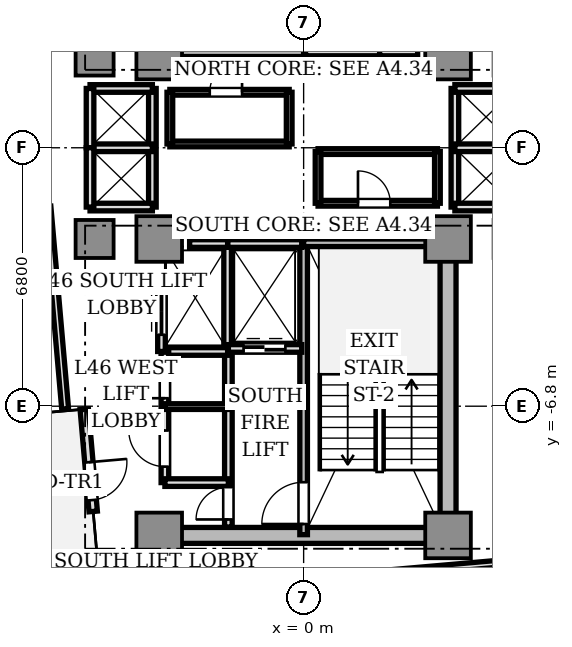
"""IFC4 building model, lengths in metres.
Left out: names, types, materials, properties, quantities, classifications, styles, units other than length and angle.
Written with IfcOpenShell. Run it as: python <this file> out.ifc"""

import sys

from ifc_helpers import new_model, si_unit, direction, frame, frame_2d, origin, origin_2d, place, context, subcontext, project, spatial, rectangle, extrude, source, transform, mapped, element, fill, save


model = new_model("IFC4")
c1 = context("Model", 3, precision=1e-05, world=origin(), true_north=direction((0.0, 1.0)))
c2 = subcontext(c1, "Body", "Model", "MODEL_VIEW")
j1 = project(units=[si_unit("LENGTHUNIT", "METRE"), si_unit("PLANEANGLEUNIT", "RADIAN")], contexts=[c1])
p1 = place(None, origin())
s1 = spatial("IfcSite", under=j1, at=p1, CompositionType="ELEMENT")
p2 = place(p1, origin())
s2 = spatial("IfcBuilding", under=s1, at=p2, CompositionType="ELEMENT")
p3 = place(p2, frame((0.0, 0.0, 167.35)))
s3 = spatial("IfcBuildingStorey", under=s2, at=p3, CompositionType="ELEMENT", Elevation=167.35)
p4 = place(p3, frame((-3.55, -10.2, 0.0), z_axis=(0.0, 0.0, 1.0), x_axis=(1.0, 0.0, 0.0)))
e1 = element("IfcWall", 1, at=p4, inside=s3, PredefinedType="SHEAR", context=c2, shape_type="SweptSolid", body=[
    extrude(rectangle(XDim=7.1, YDim=0.42, at=frame_2d((3.55, 0.0))), origin(), (0.0, 0.0, 1.0), 3.05),
])
p5 = place(p3, frame((3.8, -9.75, 0.0), z_axis=(0.0, 0.0, 1.0), x_axis=(0.0, 1.0, 0.0)))
e2 = element("IfcWall", 2, at=p5, inside=s3, PredefinedType="SHEAR", context=c2, shape_type="SweptSolid", body=[
    extrude(rectangle(XDim=6.9, YDim=0.42, at=frame_2d((3.45, 0.0))), origin(), (0.0, 0.0, 1.0), 3.05),
])
m1 = source(origin(), c2, "Body", "SweptSolid", [
    extrude(rectangle(XDim=1.2, YDim=1.2, at=origin_2d()), origin(), (0.0, 0.0, 1.0), 3.05),
])
for number, where, z_axis, x_axis in (
    (3, (-3.8, 2.4, 0.0), (0.0, 0.0, 1.0), (1.0, 0.0, 0.0)),
    (4, (3.8, 2.4, 0.0), (0.0, 0.0, 1.0), (1.0, 0.0, 0.0)),
    (5, (-3.8, -2.4, 0.0), (0.0, 0.0, 1.0), (1.0, 0.0, 0.0)),
    (6, (3.8, -2.4, 0.0), (0.0, 0.0, 1.0), (1.0, 0.0, 0.0)),
    (7, (-3.8, -10.2, 0.0), (0.0, 0.0, 1.0), (1.0, 0.0, 0.0)),
    (8, (3.8, -10.2, 0.0), (0.0, 0.0, 1.0), (1.0, 0.0, 0.0)),
):
    element("IfcColumn", number, at=place(p3, frame(where, z_axis=z_axis, x_axis=x_axis)), inside=s3, PredefinedType="COLUMN", context=c2, shape_type="MappedRepresentation", body=[
        mapped(m1, transform((0.0, 0.0, 0.0), scale=1.0)),
    ])
m2 = source(origin(), c2, "Body", "SweptSolid", [
    extrude(rectangle(XDim=1.0, YDim=1.0, at=origin_2d()), origin(), (0.0, 0.0, 1.0), 3.05),
])
for number, where, z_axis, x_axis in (
    (9, (-5.5, 2.4, 0.0), (0.0, 0.0, 1.0), (1.0, 0.0, 0.0)),
    (10, (-5.5, -2.4, 0.0), (0.0, 0.0, 1.0), (1.0, 0.0, 0.0)),
):
    element("IfcColumn", number, at=place(p3, frame(where, z_axis=z_axis, x_axis=x_axis)), inside=s3, PredefinedType="COLUMN", context=c2, shape_type="MappedRepresentation", body=[
        mapped(m2, transform((0.0, 0.0, 0.0), scale=1.0)),
    ])
p6 = place(p3, frame((-5.772, -6.879, 0.0), z_axis=(0.0, 0.0, 1.0), x_axis=(0.087168071984, -0.996193619346, 0.0)))
e11 = element("IfcWall", 11, at=p6, inside=s3, PredefinedType="STANDARD", context=c2, shape_type="SweptSolid", body=[
    extrude(rectangle(XDim=2.7, YDim=0.22, at=frame_2d((1.35, 0.0))), origin(), (0.0, 0.0, 1.0), 3.05),
])
p7 = place(p6, frame((1.4, 0.0, 0.0)))
e12 = element("IfcOpeningElement", 12, at=p7, cuts=e11, PredefinedType="OPENING", context=c2, shape_type="SweptSolid", body=[
    extrude(rectangle(XDim=1.0, YDim=2.2, at=frame_2d((0.5, 1.1))), frame((0.0, 0.12, 0.0), z_axis=(0.0, -1.0, 0.0), x_axis=(1.0, 0.0, 0.0)), (0.0, 0.0, 1.0), 0.24),
])
p8 = place(p3, frame((0.0, 2.5, 0.0), z_axis=(0.0, 0.0, 1.0), x_axis=(0.0, 1.0, 0.0)))
e13 = element("IfcWall", 13, at=p8, inside=s3, PredefinedType="SOLIDWALL", context=c2, shape_type="SweptSolid", body=[
    extrude(rectangle(XDim=7.68, YDim=0.2, at=frame_2d((3.84, 0.0))), origin(), (0.0, 0.0, 1.0), 3.05),
])
p9 = place(p8, frame((6.36, 0.0, 0.0)))
e14 = element("IfcOpeningElement", 14, at=p9, cuts=e13, PredefinedType="OPENING", context=c2, shape_type="SweptSolid", body=[
    extrude(rectangle(XDim=1.1, YDim=2.15, at=frame_2d((0.55, 1.075))), frame((0.0, 0.11, 0.0), z_axis=(0.0, -1.0, 0.0), x_axis=(1.0, 0.0, 0.0)), (0.0, 0.0, 1.0), 0.22),
])
p10 = place(p3, frame((-3.72, 2.5, 0.0), z_axis=(0.0, 0.0, 1.0), x_axis=(1.0, 0.0, 0.0)))
e15 = element("IfcWall", 15, at=p10, inside=s3, PredefinedType="SOLIDWALL", context=c2, shape_type="SweptSolid", body=[
    extrude(rectangle(XDim=3.72, YDim=0.2, at=frame_2d((1.86, 0.0))), origin(), (0.0, 0.0, 1.0), 3.05),
])
p11 = place(p3, frame((0.0, -10.18, 0.0), z_axis=(0.0, 0.0, 1.0), x_axis=(0.0, 1.0, 0.0)))
e16 = element("IfcWall", 16, at=p11, inside=s3, PredefinedType="SOLIDWALL", context=c2, shape_type="SweptSolid", body=[
    extrude(rectangle(XDim=7.68, YDim=0.2, at=frame_2d((3.84, 0.0))), origin(), (0.0, 0.0, 1.0), 3.05),
])
p12 = place(p11, frame((0.28, 0.0, 0.0)))
e17 = element("IfcOpeningElement", 17, at=p12, cuts=e16, PredefinedType="OPENING", context=c2, shape_type="SweptSolid", body=[
    extrude(rectangle(XDim=1.1, YDim=2.15, at=frame_2d((0.55, 1.075))), frame((0.0, 0.11, 0.0), z_axis=(0.0, -1.0, 0.0), x_axis=(1.0, 0.0, 0.0)), (0.0, 0.0, 1.0), 0.22),
])
p13 = place(p3, frame((0.0, -2.5, 0.0), z_axis=(0.0, 0.0, 1.0), x_axis=(1.0, 0.0, 0.0)))
e18 = element("IfcWall", 18, at=p13, inside=s3, PredefinedType="SOLIDWALL", context=c2, shape_type="SweptSolid", body=[
    extrude(rectangle(XDim=3.72, YDim=0.2, at=frame_2d((1.86, 0.0))), origin(), (0.0, 0.0, 1.0), 3.05),
])
p14 = place(p3, frame((-1.98, -9.98, 0.0), z_axis=(0.0, 0.0, 1.0), x_axis=(0.0, 1.0, 0.0)))
e19 = element("IfcWall", 19, at=p14, inside=s3, PredefinedType="SOLIDWALL", context=c2, shape_type="SweptSolid", body=[
    extrude(rectangle(XDim=4.66, YDim=0.2, at=frame_2d((2.33, 0.0))), origin(), (0.0, 0.0, 1.0), 2.6),
])
p15 = place(p14, frame((0.2, 0.0, 0.0)))
e20 = element("IfcOpeningElement", 20, at=p15, cuts=e19, PredefinedType="OPENING", context=c2, shape_type="SweptSolid", body=[
    extrude(rectangle(XDim=0.85, YDim=2.1, at=frame_2d((0.425, 1.05))), frame((0.0, 0.11, 0.0), z_axis=(0.0, -1.0, 0.0), x_axis=(1.0, 0.0, 0.0)), (0.0, 0.0, 1.0), 0.22),
])
p16 = place(p3, frame((2.0, 2.5, 0.0), z_axis=(0.0, 0.0, 1.0), x_axis=(0.0, 1.0, 0.0)))
e21 = element("IfcWall", 21, at=p16, inside=s3, PredefinedType="SOLIDWALL", context=c2, shape_type="SweptSolid", body=[
    extrude(rectangle(XDim=2.78, YDim=0.2, at=frame_2d((1.39, 0.0))), origin(), (0.0, 0.0, 1.0), 2.6),
])
p17 = place(p3, frame((0.05, 2.52, 0.0), z_axis=(0.0, 0.0, 1.0), x_axis=(1.0, 0.0, 0.0)))
e22 = element("IfcWall", 22, at=p17, inside=s3, PredefinedType="SOLIDWALL", context=c2, shape_type="SweptSolid", body=[
    extrude(rectangle(XDim=1.95, YDim=0.2, at=frame_2d((0.975, 0.0))), origin(), (0.0, 0.0, 1.0), 2.6),
])
p18 = place(p3, frame((-2.0, -5.28, 0.0), z_axis=(0.0, 0.0, 1.0), x_axis=(0.0, 1.0, 0.0)))
e23 = element("IfcWall", 23, at=p18, inside=s3, PredefinedType="SOLIDWALL", context=c2, shape_type="SweptSolid", body=[
    extrude(rectangle(XDim=2.78, YDim=0.2, at=frame_2d((1.39, 0.0))), origin(), (0.0, 0.0, 1.0), 2.6),
])
p19 = place(p3, frame((-2.0, -2.52, 0.0), z_axis=(0.0, 0.0, 1.0), x_axis=(1.0, 0.0, 0.0)))
e24 = element("IfcWall", 24, at=p19, inside=s3, PredefinedType="SOLIDWALL", context=c2, shape_type="SweptSolid", body=[
    extrude(rectangle(XDim=1.95, YDim=0.2, at=frame_2d((0.975, 0.0))), origin(), (0.0, 0.0, 1.0), 2.6),
])
p20 = place(p3, frame((-1.98, -5.28, 0.0), z_axis=(0.0, 0.0, 1.0), x_axis=(1.0, 0.0, 0.0)))
e25 = element("IfcWall", 25, at=p20, inside=s3, PredefinedType="SOLIDWALL", context=c2, shape_type="SweptSolid", body=[
    extrude(rectangle(XDim=1.93, YDim=0.2, at=frame_2d((0.965, 0.0))), origin(), (0.0, 0.0, 1.0), 2.6),
])
p21 = place(p20, frame((0.4, 0.0, 0.0)))
e26 = element("IfcOpeningElement", 26, at=p21, cuts=e25, PredefinedType="OPENING", context=c2, shape_type="SweptSolid", body=[
    extrude(rectangle(XDim=1.1, YDim=2.2, at=frame_2d((0.55, 1.1))), frame((0.0, 0.11, 0.0), z_axis=(0.0, -1.0, 0.0), x_axis=(1.0, 0.0, 0.0)), (0.0, 0.0, 1.0), 0.22),
])
for number, where, z_axis, x_axis in (
    (27, (2.0, 2.52, 0.0), (0.0, 0.0, 1.0), (1.0, 0.0, 0.0)),
    (28, (-3.0, -2.52, 0.0), (0.0, 0.0, 1.0), (1.0, 0.0, 0.0)),
):
    element("IfcWall", number, at=place(p3, frame(where, z_axis=z_axis, x_axis=x_axis)), inside=s3, PredefinedType="SOLIDWALL", context=c2, shape_type="SweptSolid", body=[
        extrude(rectangle(XDim=1.0, YDim=0.2, at=frame_2d((0.5, 0.0))), origin(), (0.0, 0.0, 1.0), 2.6),
    ])
p22 = place(p3, frame((-3.74, -5.36, 0.0), z_axis=(0.0, 0.0, 1.0), x_axis=(1.0, 0.0, 0.0)))
e29 = element("IfcWall", 29, at=p22, inside=s3, PredefinedType="SOLIDWALL", context=c2, shape_type="SweptSolid", body=[
    extrude(rectangle(XDim=1.74, YDim=0.2, at=frame_2d((0.87, 0.0))), origin(), (0.0, 0.0, 1.0), 2.6),
])
p23 = place(p3, frame((-3.74, -5.36, 0.0), z_axis=(0.0, 0.0, 1.0), x_axis=(0.0, 1.0, 0.0)))
e30 = element("IfcWall", 30, at=p23, inside=s3, PredefinedType="SOLIDWALL", context=c2, shape_type="SweptSolid", body=[
    extrude(rectangle(XDim=2.08, YDim=0.2, at=frame_2d((1.04, 0.0))), origin(), (0.0, 0.0, 1.0), 2.6),
])
p24 = place(p23, frame((0.44, 0.0, 0.0)))
e31 = element("IfcOpeningElement", 31, at=p24, cuts=e30, PredefinedType="OPENING", context=c2, shape_type="SweptSolid", body=[
    extrude(rectangle(XDim=1.2, YDim=2.2, at=frame_2d((0.6, 1.1))), frame((0.0, 0.11, 0.0), z_axis=(0.0, -1.0, 0.0), x_axis=(1.0, 0.0, 0.0)), (0.0, 0.0, 1.0), 0.22),
])
p25 = place(p3, frame((3.98, -1.56, 0.0), z_axis=(0.0, 0.0, 1.0), x_axis=(0.0, 1.0, 0.0)))
e32 = element("IfcWall", 32, at=p25, inside=s3, PredefinedType="SOLIDWALL", context=c2, shape_type="SweptSolid", body=[
    extrude(rectangle(XDim=3.12, YDim=0.2, at=frame_2d((1.56, 0.0))), origin(), (0.0, 0.0, 1.0), 2.22),
])
for number, where, z_axis, x_axis in (
    (33, (3.98, 1.56, 0.0), (0.0, 0.0, 1.0), (1.0, 0.0, 0.0)),
    (34, (3.98, -1.56, 0.0), (0.0, 0.0, 1.0), (1.0, 0.0, 0.0)),
    (35, (3.98, 0.0, 0.0), (0.0, 0.0, 1.0), (1.0, 0.0, 0.0)),
):
    element("IfcWall", number, at=place(p3, frame(where, z_axis=z_axis, x_axis=x_axis)), inside=s3, PredefinedType="SOLIDWALL", context=c2, shape_type="SweptSolid", body=[
        extrude(rectangle(XDim=1.64, YDim=0.2, at=frame_2d((0.82, 0.0))), origin(), (0.0, 0.0, 1.0), 2.6),
    ])
p26 = place(p3, frame((-3.98, -1.56, 0.0), z_axis=(0.0, 0.0, 1.0), x_axis=(0.0, 1.0, 0.0)))
e36 = element("IfcWall", 36, at=p26, inside=s3, PredefinedType="SOLIDWALL", context=c2, shape_type="SweptSolid", body=[
    extrude(rectangle(XDim=3.12, YDim=0.2, at=frame_2d((1.56, 0.0))), origin(), (0.0, 0.0, 1.0), 2.22),
])
for number, where, z_axis, x_axis in (
    (37, (-5.62, 1.56, 0.0), (0.0, 0.0, 1.0), (1.0, 0.0, 0.0)),
    (38, (-5.62, -1.56, 0.0), (0.0, 0.0, 1.0), (1.0, 0.0, 0.0)),
    (39, (-5.62, 0.0, 0.0), (0.0, 0.0, 1.0), (1.0, 0.0, 0.0)),
):
    element("IfcWall", number, at=place(p3, frame(where, z_axis=z_axis, x_axis=x_axis)), inside=s3, PredefinedType="SOLIDWALL", context=c2, shape_type="SweptSolid", body=[
        extrude(rectangle(XDim=1.64, YDim=0.2, at=frame_2d((0.82, 0.0))), origin(), (0.0, 0.0, 1.0), 2.6),
    ])
for number, where, z_axis, x_axis in (
    (40, (-5.62, 0.0, 0.0), (0.0, 0.0, 1.0), (0.0, 1.0, 0.0)),
    (41, (-5.62, -1.56, 0.0), (0.0, 0.0, 1.0), (0.0, 1.0, 0.0)),
):
    element("IfcWall", number, at=place(p3, frame(where, z_axis=z_axis, x_axis=x_axis)), inside=s3, PredefinedType="SOLIDWALL", context=c2, shape_type="SweptSolid", body=[
        extrude(rectangle(XDim=1.56, YDim=0.2, at=frame_2d((0.78, 0.0))), origin(), (0.0, 0.0, 1.0), 2.6),
    ])
p27 = place(p3, frame((-3.65, -8.81, 0.0), z_axis=(0.0, 0.0, 1.0), x_axis=(0.0, 1.0, 0.0)))
e42 = element("IfcWall", 42, at=p27, inside=s3, PredefinedType="SOLIDWALL", context=c2, shape_type="SweptSolid", body=[
    extrude(rectangle(XDim=3.43, YDim=0.2, at=frame_2d((1.715, 0.0))), origin(), (0.0, 0.0, 1.0), 2.6),
])
p28 = place(p27, frame((0.42, 0.0, 0.0)))
e43 = element("IfcOpeningElement", 43, at=p28, cuts=e42, PredefinedType="OPENING", context=c2, shape_type="SweptSolid", body=[
    extrude(rectangle(XDim=0.95, YDim=2.15, at=frame_2d((0.475, 1.075))), frame((0.0, 0.11, 0.0), z_axis=(0.0, -1.0, 0.0), x_axis=(1.0, 0.0, 0.0)), (0.0, 0.0, 1.0), 0.22),
])
p29 = place(p27, frame((2.22, 0.0, 0.0)))
e44 = element("IfcOpeningElement", 44, at=p29, cuts=e42, PredefinedType="OPENING", context=c2, shape_type="SweptSolid", body=[
    extrude(rectangle(XDim=0.85, YDim=2.1, at=frame_2d((0.425, 1.05))), frame((0.0, 0.11, 0.0), z_axis=(0.0, -1.0, 0.0), x_axis=(1.0, 0.0, 0.0)), (0.0, 0.0, 1.0), 0.22),
])
p30 = place(p3, frame((-3.65, -8.81, 0.0), z_axis=(0.0, 0.0, 1.0), x_axis=(1.0, 0.0, 0.0)))
e45 = element("IfcWall", 45, at=p30, inside=s3, PredefinedType="SOLIDWALL", context=c2, shape_type="SweptSolid", body=[
    extrude(rectangle(XDim=1.67, YDim=0.2, at=frame_2d((0.835, 0.0))), origin(), (0.0, 0.0, 1.0), 2.6),
])
p31 = place(p3, frame((-3.65, -6.81, 0.0), z_axis=(0.0, 0.0, 1.0), x_axis=(1.0, 0.0, 0.0)))
e46 = element("IfcWall", 46, at=p31, inside=s3, PredefinedType="PARTITIONING", context=c2, shape_type="SweptSolid", body=[
    extrude(rectangle(XDim=1.67, YDim=0.15, at=frame_2d((0.835, 0.0))), origin(), (0.0, 0.0, 1.0), 2.6),
])
p32 = place(p3, frame((-3.52, 0.1, 0.0), z_axis=(0.0, 0.0, 1.0), x_axis=(1.0, 0.0, 0.0)))
e47 = element("IfcWall", 47, at=p32, inside=s3, PredefinedType="PARTITIONING", context=c2, shape_type="SweptSolid", body=[
    extrude(rectangle(XDim=3.14, YDim=0.15, at=frame_2d((1.57, 0.0))), origin(), (0.0, 0.0, 1.0), 2.6),
])
p33 = place(p3, frame((-3.52, 1.46, 0.0), z_axis=(0.0, 0.0, 1.0), x_axis=(1.0, 0.0, 0.0)))
e48 = element("IfcWall", 48, at=p33, inside=s3, PredefinedType="PARTITIONING", context=c2, shape_type="SweptSolid", body=[
    extrude(rectangle(XDim=3.14, YDim=0.15, at=frame_2d((1.57, 0.0))), origin(), (0.0, 0.0, 1.0), 2.6),
])
p34 = place(p33, frame((1.05, 0.0, 0.0)))
e49 = element("IfcOpeningElement", 49, at=p34, cuts=e48, PredefinedType="OPENING", context=c2, shape_type="SweptSolid", body=[
    extrude(rectangle(XDim=0.85, YDim=2.1, at=frame_2d((0.425, 1.05))), frame((0.0, 0.085, 0.0), z_axis=(0.0, -1.0, 0.0), x_axis=(1.0, 0.0, 0.0)), (0.0, 0.0, 1.0), 0.17),
])
p35 = place(p3, frame((-3.52, 0.1, 0.0), z_axis=(0.0, 0.0, 1.0), x_axis=(0.0, 1.0, 0.0)))
e50 = element("IfcWall", 50, at=p35, inside=s3, PredefinedType="PARTITIONING", context=c2, shape_type="SweptSolid", body=[
    extrude(rectangle(XDim=1.36, YDim=0.15, at=frame_2d((0.68, 0.0))), origin(), (0.0, 0.0, 1.0), 2.22),
])
p36 = place(p3, frame((-0.38, 0.1, 0.0), z_axis=(0.0, 0.0, 1.0), x_axis=(0.0, 1.0, 0.0)))
e51 = element("IfcWall", 51, at=p36, inside=s3, PredefinedType="PARTITIONING", context=c2, shape_type="SweptSolid", body=[
    extrude(rectangle(XDim=1.36, YDim=0.15, at=frame_2d((0.68, 0.0))), origin(), (0.0, 0.0, 1.0), 2.6),
])
p37 = place(p3, frame((0.38, -0.1, 0.0), z_axis=(0.0, 0.0, 1.0), x_axis=(1.0, 0.0, 0.0)))
e52 = element("IfcWall", 52, at=p37, inside=s3, PredefinedType="PARTITIONING", context=c2, shape_type="SweptSolid", body=[
    extrude(rectangle(XDim=3.14, YDim=0.15, at=frame_2d((1.57, 0.0))), origin(), (0.0, 0.0, 1.0), 2.6),
])
p38 = place(p3, frame((0.38, -1.46, 0.0), z_axis=(0.0, 0.0, 1.0), x_axis=(1.0, 0.0, 0.0)))
e53 = element("IfcWall", 53, at=p38, inside=s3, PredefinedType="PARTITIONING", context=c2, shape_type="SweptSolid", body=[
    extrude(rectangle(XDim=3.14, YDim=0.15, at=frame_2d((1.57, 0.0))), origin(), (0.0, 0.0, 1.0), 2.6),
])
p39 = place(p38, frame((1.05, 0.0, 0.0)))
e54 = element("IfcOpeningElement", 54, at=p39, cuts=e53, PredefinedType="OPENING", context=c2, shape_type="SweptSolid", body=[
    extrude(rectangle(XDim=0.85, YDim=2.1, at=frame_2d((0.425, 1.05))), frame((0.0, 0.085, 0.0), z_axis=(0.0, -1.0, 0.0), x_axis=(1.0, 0.0, 0.0)), (0.0, 0.0, 1.0), 0.17),
])
p40 = place(p3, frame((0.38, -1.46, 0.0), z_axis=(0.0, 0.0, 1.0), x_axis=(0.0, 1.0, 0.0)))
e55 = element("IfcWall", 55, at=p40, inside=s3, PredefinedType="PARTITIONING", context=c2, shape_type="SweptSolid", body=[
    extrude(rectangle(XDim=1.36, YDim=0.15, at=frame_2d((0.68, 0.0))), origin(), (0.0, 0.0, 1.0), 2.6),
])
p41 = place(p3, frame((3.52, -1.46, 0.0), z_axis=(0.0, 0.0, 1.0), x_axis=(0.0, 1.0, 0.0)))
e56 = element("IfcWall", 56, at=p41, inside=s3, PredefinedType="PARTITIONING", context=c2, shape_type="SweptSolid", body=[
    extrude(rectangle(XDim=1.36, YDim=0.15, at=frame_2d((0.68, 0.0))), origin(), (0.0, 0.0, 1.0), 2.22),
])
p42 = place(p3, frame((-6.741, -1.543, 0.0), z_axis=(0.0, 0.0, 1.0), x_axis=(0.087161289348, -0.996194212812, 0.0)))
e57 = element("IfcWall", 57, at=p42, inside=s3, PredefinedType="PARTITIONING", context=c2, shape_type="SweptSolid", body=[
    extrude(rectangle(XDim=5.35, YDim=0.18, at=frame_2d((2.675, 0.0))), origin(), (0.0, 0.0, 1.0), 2.6),
])
p43 = place(p3, frame((-5.287, -11.856, 0.0), z_axis=(0.0, 0.0, 1.0), x_axis=(0.996194023261, 0.087163455754, 0.0)))
e58 = element("IfcWall", 58, at=p43, inside=s3, PredefinedType="PARTITIONING", context=c2, shape_type="SweptSolid", body=[
    extrude(rectangle(XDim=10.4, YDim=0.18, at=frame_2d((5.2, 0.0))), origin(), (0.0, 0.0, 1.0), 2.6),
])
m3 = source(origin(), c2, "Body", "SweptSolid", [
    extrude(rectangle(XDim=1.0, YDim=0.05, at=origin_2d()), origin(), (0.0, 0.0, 1.0), 2.2),
])
p44 = place(p7, frame((0.5, 0.0, 0.0)))
e59 = element("IfcDoor", 59, at=p44, inside=s3, OperationType="SINGLE_SWING_LEFT", PredefinedType="DOOR", context=c2, shape_type="MappedRepresentation", body=[
    mapped(m3, transform((0.0, 0.0, 0.0), scale=1.0)),
])
fill(e12, e59)
m4 = source(origin(), c2, "Body", "SweptSolid", [
    extrude(rectangle(XDim=1.1, YDim=0.05, at=origin_2d()), origin(), (0.0, 0.0, 1.0), 2.15),
])
p45 = place(p12, frame((0.55, 0.0, 0.0)))
e60 = element("IfcDoor", 60, at=p45, inside=s3, OperationType="SINGLE_SWING_LEFT", PredefinedType="DOOR", context=c2, shape_type="MappedRepresentation", body=[
    mapped(m4, transform((0.0, 0.0, 0.0), scale=1.0)),
])
fill(e17, e60)
m5 = source(origin(), c2, "Body", "SweptSolid", [
    extrude(rectangle(XDim=0.85, YDim=0.05, at=origin_2d()), origin(), (0.0, 0.0, 1.0), 2.1),
])
p46 = place(p15, frame((0.425, 0.0, 0.0)))
e61 = element("IfcDoor", 61, at=p46, inside=s3, OperationType="SINGLE_SWING_LEFT", PredefinedType="DOOR", context=c2, shape_type="MappedRepresentation", body=[
    mapped(m5, transform((0.0, 0.0, 0.0), scale=1.0)),
])
fill(e20, e61)
m6 = source(origin(), c2, "Body", "SweptSolid", [
    extrude(rectangle(XDim=1.1, YDim=0.05, at=origin_2d()), origin(), (0.0, 0.0, 1.0), 2.2),
])
p47 = place(p21, frame((0.55, 0.0, 0.0)))
e62 = element("IfcDoor", 62, at=p47, inside=s3, OperationType="DOUBLE_DOOR_SLIDING", PredefinedType="DOOR", context=c2, shape_type="MappedRepresentation", body=[
    mapped(m6, transform((0.0, 0.0, 0.0), scale=1.0)),
])
fill(e26, e62)
m7 = source(origin(), c2, "Body", "SweptSolid", [
    extrude(rectangle(XDim=1.2, YDim=0.05, at=origin_2d()), origin(), (0.0, 0.0, 1.0), 2.2),
])
p48 = place(p24, frame((0.6, 0.0, 0.0)))
e63 = element("IfcDoor", 63, at=p48, inside=s3, OperationType="DOUBLE_DOOR_SLIDING", PredefinedType="DOOR", context=c2, shape_type="MappedRepresentation", body=[
    mapped(m7, transform((0.0, 0.0, 0.0), scale=1.0)),
])
fill(e31, e63)
m8 = source(origin(), c2, "Body", "SweptSolid", [
    extrude(rectangle(XDim=0.95, YDim=0.05, at=origin_2d()), origin(), (0.0, 0.0, 1.0), 2.15),
])
p49 = place(p28, frame((0.475, 0.0, 0.0)))
e64 = element("IfcDoor", 64, at=p49, inside=s3, OperationType="SINGLE_SWING_RIGHT", PredefinedType="DOOR", context=c2, shape_type="MappedRepresentation", body=[
    mapped(m8, transform((0.0, 0.0, 0.0), scale=1.0)),
])
fill(e43, e64)
p50 = place(p29, frame((0.425, 0.0, 0.0)))
e65 = element("IfcDoor", 65, at=p50, inside=s3, OperationType="SINGLE_SWING_LEFT", PredefinedType="DOOR", context=c2, shape_type="MappedRepresentation", body=[
    mapped(m5, transform((0.0, 0.0, 0.0), scale=1.0)),
])
fill(e44, e65)
p51 = place(p34, frame((0.425, 0.0, 0.0)))
e66 = element("IfcDoor", 66, at=p51, inside=s3, OperationType="SINGLE_SWING_RIGHT", PredefinedType="DOOR", context=c2, shape_type="MappedRepresentation", body=[
    mapped(m5, transform((0.0, 0.0, 0.0), scale=1.0)),
])
fill(e49, e66)
p52 = place(p39, frame((0.425, 0.0, 0.0)))
e67 = element("IfcDoor", 67, at=p52, inside=s3, OperationType="SINGLE_SWING_LEFT", PredefinedType="DOOR", context=c2, shape_type="MappedRepresentation", body=[
    mapped(m5, transform((0.0, 0.0, 0.0), scale=1.0)),
])
fill(e54, e67)
save(model, sys.argv[1])
